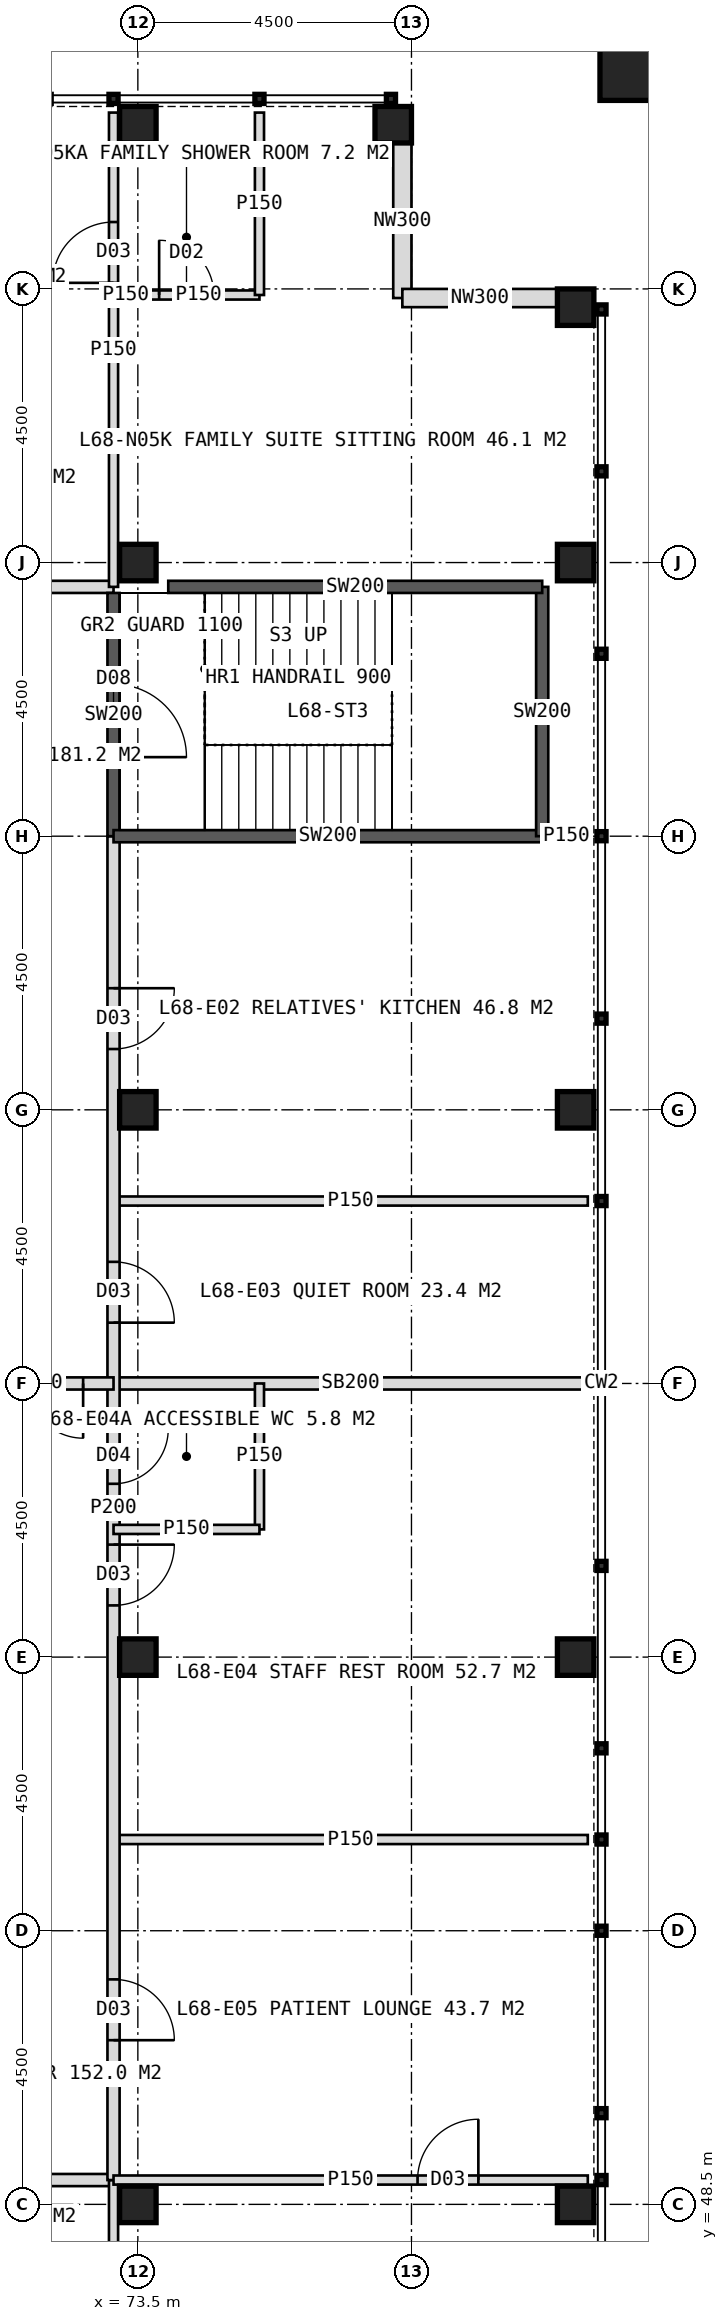
"""IFC4 building model, lengths in metres.
Left out: names, types, materials, properties, quantities, classifications, styles, units other than length and angle.
Written with IfcOpenShell. Run it as: python <this file> out.ifc"""

import sys

from ifc_helpers import new_model, si_unit, direction, frame, frame_2d, origin, origin_2d, place, context, subcontext, project, spatial, rectangle, hollow_rectangle, extrude, element, fill, save


model = new_model("IFC4")
c1 = context("Model", 3, precision=1e-05, world=origin(), true_north=direction((0.0, 1.0)))
c2 = subcontext(c1, "Body", "Model", "MODEL_VIEW")
j1 = project(units=[si_unit("LENGTHUNIT", "METRE"), si_unit("PLANEANGLEUNIT", "RADIAN")], contexts=[c1])
p1 = place(None, origin())
s1 = spatial("IfcSite", under=j1, at=p1, CompositionType="ELEMENT")
p2 = place(p1, origin())
s2 = spatial("IfcBuilding", under=s1, at=p2, CompositionType="ELEMENT")
p3 = place(p2, frame((0.0, 0.0, 282.0)))
s3 = spatial("IfcBuildingStorey", under=s2, at=p3, CompositionType="ELEMENT", Elevation=282.0)
for number, where, z_axis, x_axis in (
    (1, (73.5, 48.5, 0.0), (0.0, 0.0, 1.0), (1.0, 0.0, 0.0)),
    (2, (73.5, 75.5, 0.0), (0.0, 0.0, 1.0), (1.0, 0.0, 0.0)),
    (3, (73.5, 57.5, 0.0), (0.0, 0.0, 1.0), (1.0, 0.0, 0.0)),
    (4, (73.5, 66.5, 0.0), (0.0, 0.0, 1.0), (1.0, 0.0, 0.0)),
    (5, (80.7, 48.5, 0.0), (0.0, 0.0, 1.0), (1.0, 0.0, 0.0)),
    (6, (80.7, 57.5, 0.0), (0.0, 0.0, 1.0), (1.0, 0.0, 0.0)),
    (7, (80.7, 66.5, 0.0), (0.0, 0.0, 1.0), (1.0, 0.0, 0.0)),
    (8, (73.5, 82.7, 0.0), (0.0, 0.0, 1.0), (1.0, 0.0, 0.0)),
    (9, (80.7, 75.5, 0.0), (0.0, 0.0, 1.0), (1.0, 0.0, 0.0)),
    (10, (77.7, 82.7, 0.0), (0.0, 0.0, 1.0), (1.0, 0.0, 0.0)),
    (11, (80.7, 79.7, 0.0), (0.0, 0.0, 1.0), (1.0, 0.0, 0.0)),
):
    element("IfcColumn", number, at=place(p3, frame(where, z_axis=z_axis, x_axis=x_axis)), inside=s3, PredefinedType="COLUMN", context=c2, shape_type="SweptSolid", body=[
        extrude(hollow_rectangle(XDim=0.6, YDim=0.6, WallThickness=0.04, at=origin_2d()), origin(), (0.0, 0.0, 1.0), 4.0),
    ])
p4 = place(p3, frame((81.6, 83.6, 0.0), z_axis=(0.0, 0.0, 1.0), x_axis=(1.0, 0.0, 0.0)))
e12 = element("IfcColumn", 12, at=p4, inside=s3, PredefinedType="COLUMN", context=c2, shape_type="SweptSolid", body=[
    extrude(hollow_rectangle(XDim=1.0, YDim=1.0, WallThickness=0.06, at=origin_2d()), origin(), (0.0, 0.0, 1.0), 4.0),
])
for number, where, z_axis, x_axis in (
    (13, (77.85, 82.4, 0.0), (0.0, 0.0, 1.0), (0.0, -1.0, 0.0)),
    (14, (77.85, 79.85, 0.0), (0.0, 0.0, 1.0), (1.0, 0.0, 0.0)),
):
    element("IfcWall", number, at=place(p3, frame(where, z_axis=z_axis, x_axis=x_axis)), inside=s3, PredefinedType="ELEMENTEDWALL", context=c2, shape_type="SweptSolid", body=[
        extrude(rectangle(XDim=2.55, YDim=0.3, at=frame_2d((1.275, 0.0))), origin(), (0.0, 0.0, 1.0), 2.95),
    ])
p5 = place(p3, frame((46.9, 75.1, 0.0), z_axis=(0.0, 0.0, 1.0), x_axis=(1.0, 0.0, 0.0)))
e15 = element("IfcWall", 15, at=p5, inside=s3, PredefinedType="PARTITIONING", context=c2, shape_type="SweptSolid", body=[
    extrude(rectangle(XDim=26.2, YDim=0.2, at=frame_2d((13.1, 0.0))), origin(), (0.0, 0.0, 1.0), 3.75),
])
p6 = place(p5, frame((1.55, 0.0, 0.0)))
e16 = element("IfcOpeningElement", 16, at=p6, cuts=e15, PredefinedType="OPENING", context=c2, shape_type="SweptSolid", body=[
    extrude(rectangle(XDim=1.0, YDim=2.1, at=frame_2d((0.5, 1.05))), frame((0.0, 0.11, 0.0), z_axis=(0.0, -1.0, 0.0), x_axis=(1.0, 0.0, 0.0)), (0.0, 0.0, 1.0), 0.22),
])
p7 = place(p5, frame((6.75, 0.0, 0.0)))
e17 = element("IfcOpeningElement", 17, at=p7, cuts=e15, PredefinedType="OPENING", context=c2, shape_type="SweptSolid", body=[
    extrude(rectangle(XDim=1.0, YDim=2.1, at=frame_2d((0.5, 1.05))), frame((0.0, 0.11, 0.0), z_axis=(0.0, -1.0, 0.0), x_axis=(1.0, 0.0, 0.0)), (0.0, 0.0, 1.0), 0.22),
])
p8 = place(p5, frame((14.25, 0.0, 0.0)))
e18 = element("IfcOpeningElement", 18, at=p8, cuts=e15, PredefinedType="OPENING", context=c2, shape_type="SweptSolid", body=[
    extrude(rectangle(XDim=1.2, YDim=2.2, at=frame_2d((0.6, 1.1))), frame((0.0, 0.11, 0.0), z_axis=(0.0, -1.0, 0.0), x_axis=(1.0, 0.0, 0.0)), (0.0, 0.0, 1.0), 0.22),
])
p9 = place(p5, frame((18.45, 0.0, 0.0)))
e19 = element("IfcOpeningElement", 19, at=p9, cuts=e15, PredefinedType="OPENING", context=c2, shape_type="SweptSolid", body=[
    extrude(rectangle(XDim=1.0, YDim=2.1, at=frame_2d((0.5, 1.05))), frame((0.0, 0.11, 0.0), z_axis=(0.0, -1.0, 0.0), x_axis=(1.0, 0.0, 0.0)), (0.0, 0.0, 1.0), 0.22),
])
p10 = place(p5, frame((23.25, 0.0, 0.0)))
e20 = element("IfcOpeningElement", 20, at=p10, cuts=e15, PredefinedType="OPENING", context=c2, shape_type="SweptSolid", body=[
    extrude(rectangle(XDim=1.2, YDim=2.2, at=frame_2d((0.6, 1.1))), frame((0.0, 0.11, 0.0), z_axis=(0.0, -1.0, 0.0), x_axis=(1.0, 0.0, 0.0)), (0.0, 0.0, 1.0), 0.22),
])
p11 = place(p3, frame((73.1, 75.1, 0.0), z_axis=(0.0, 0.0, 1.0), x_axis=(0.0, 1.0, 0.0)))
e21 = element("IfcWall", 21, at=p11, inside=s3, PredefinedType="PARTITIONING", context=c2, shape_type="SweptSolid", body=[
    extrude(rectangle(XDim=7.8, YDim=0.15, at=frame_2d((3.9, 0.0))), origin(), (0.0, 0.0, 1.0), 3.75),
])
p12 = place(p11, frame((5.0, 0.0, 0.0)))
e22 = element("IfcOpeningElement", 22, at=p12, cuts=e21, PredefinedType="OPENING", context=c2, shape_type="SweptSolid", body=[
    extrude(rectangle(XDim=1.0, YDim=2.1, at=frame_2d((0.5, 1.05))), frame((0.0, 0.085, 0.0), z_axis=(0.0, -1.0, 0.0), x_axis=(1.0, 0.0, 0.0)), (0.0, 0.0, 1.0), 0.17),
])
p13 = place(p3, frame((73.1, 79.9, 0.0), z_axis=(0.0, 0.0, 1.0), x_axis=(1.0, 0.0, 0.0)))
e23 = element("IfcWall", 23, at=p13, inside=s3, PredefinedType="PARTITIONING", context=c2, shape_type="SweptSolid", body=[
    extrude(rectangle(XDim=0.4, YDim=0.15, at=frame_2d((0.2, 0.0))), origin(), (0.0, 0.0, 1.0), 3.75),
])
p14 = place(p3, frame((73.5, 79.9, 0.0), z_axis=(0.0, 0.0, 1.0), x_axis=(1.0, 0.0, 0.0)))
e24 = element("IfcWall", 24, at=p14, inside=s3, PredefinedType="PARTITIONING", context=c2, shape_type="SweptSolid", body=[
    extrude(rectangle(XDim=2.0, YDim=0.15, at=frame_2d((1.0, 0.0))), origin(), (0.0, 0.0, 1.0), 2.95),
])
p15 = place(p14, frame((0.35, 0.0, 0.0)))
e25 = element("IfcOpeningElement", 25, at=p15, cuts=e24, PredefinedType="OPENING", context=c2, shape_type="SweptSolid", body=[
    extrude(rectangle(XDim=0.9, YDim=2.1, at=frame_2d((0.45, 1.05))), frame((0.0, 0.085, 0.0), z_axis=(0.0, -1.0, 0.0), x_axis=(1.0, 0.0, 0.0)), (0.0, 0.0, 1.0), 0.17),
])
p16 = place(p3, frame((75.5, 79.9, 0.0), z_axis=(0.0, 0.0, 1.0), x_axis=(0.0, 1.0, 0.0)))
e26 = element("IfcWall", 26, at=p16, inside=s3, PredefinedType="PARTITIONING", context=c2, shape_type="SweptSolid", body=[
    extrude(rectangle(XDim=3.0, YDim=0.15, at=frame_2d((1.5, 0.0))), origin(), (0.0, 0.0, 1.0), 3.75),
])
p17 = place(p3, frame((73.1, 48.9, 0.0), z_axis=(0.0, 0.0, 1.0), x_axis=(-1.0, 0.0, 0.0)))
e27 = element("IfcWall", 27, at=p17, inside=s3, PredefinedType="PARTITIONING", context=c2, shape_type="SweptSolid", body=[
    extrude(rectangle(XDim=26.2, YDim=0.2, at=frame_2d((13.1, 0.0))), origin(), (0.0, 0.0, 1.0), 3.75),
])
p18 = place(p17, frame((1.75, 0.0, 0.0)))
e28 = element("IfcOpeningElement", 28, at=p18, cuts=e27, PredefinedType="OPENING", context=c2, shape_type="SweptSolid", body=[
    extrude(rectangle(XDim=1.2, YDim=2.2, at=frame_2d((0.6, 1.1))), frame((0.0, 0.11, 0.0), z_axis=(0.0, -1.0, 0.0), x_axis=(1.0, 0.0, 0.0)), (0.0, 0.0, 1.0), 0.22),
])
p19 = place(p17, frame((6.75, 0.0, 0.0)))
e29 = element("IfcOpeningElement", 29, at=p19, cuts=e27, PredefinedType="OPENING", context=c2, shape_type="SweptSolid", body=[
    extrude(rectangle(XDim=1.0, YDim=2.1, at=frame_2d((0.5, 1.05))), frame((0.0, 0.11, 0.0), z_axis=(0.0, -1.0, 0.0), x_axis=(1.0, 0.0, 0.0)), (0.0, 0.0, 1.0), 0.22),
])
p20 = place(p17, frame((11.85, 0.0, 0.0)))
e30 = element("IfcOpeningElement", 30, at=p20, cuts=e27, PredefinedType="OPENING", context=c2, shape_type="SweptSolid", body=[
    extrude(rectangle(XDim=1.0, YDim=2.1, at=frame_2d((0.5, 1.05))), frame((0.0, 0.11, 0.0), z_axis=(0.0, -1.0, 0.0), x_axis=(1.0, 0.0, 0.0)), (0.0, 0.0, 1.0), 0.22),
])
p21 = place(p17, frame((15.75, 0.0, 0.0)))
e31 = element("IfcOpeningElement", 31, at=p21, cuts=e27, PredefinedType="OPENING", context=c2, shape_type="SweptSolid", body=[
    extrude(rectangle(XDim=1.0, YDim=2.1, at=frame_2d((0.5, 1.05))), frame((0.0, 0.11, 0.0), z_axis=(0.0, -1.0, 0.0), x_axis=(1.0, 0.0, 0.0)), (0.0, 0.0, 1.0), 0.22),
])
p22 = place(p17, frame((23.25, 0.0, 0.0)))
e32 = element("IfcOpeningElement", 32, at=p22, cuts=e27, PredefinedType="OPENING", context=c2, shape_type="SweptSolid", body=[
    extrude(rectangle(XDim=1.2, YDim=2.2, at=frame_2d((0.6, 1.1))), frame((0.0, 0.11, 0.0), z_axis=(0.0, -1.0, 0.0), x_axis=(1.0, 0.0, 0.0)), (0.0, 0.0, 1.0), 0.22),
])
p23 = place(p3, frame((73.1, 48.9, 0.0), z_axis=(0.0, 0.0, 1.0), x_axis=(0.0, -1.0, 0.0)))
e33 = element("IfcWall", 33, at=p23, inside=s3, PredefinedType="PARTITIONING", context=c2, shape_type="SweptSolid", body=[
    extrude(rectangle(XDim=7.8, YDim=0.15, at=frame_2d((3.9, 0.0))), origin(), (0.0, 0.0, 1.0), 3.75),
])
p24 = place(p3, frame((80.2, 71.0, 0.0), z_axis=(0.0, 0.0, 1.0), x_axis=(1.0, 0.0, 0.0)))
e34 = element("IfcWall", 34, at=p24, inside=s3, PredefinedType="PARTITIONING", context=c2, shape_type="SweptSolid", body=[
    extrude(rectangle(XDim=0.7, YDim=0.15, at=frame_2d((0.35, 0.0))), origin(), (0.0, 0.0, 1.0), 3.75),
])
p25 = place(p3, frame((73.1, 65.0, 0.0), z_axis=(0.0, 0.0, 1.0), x_axis=(1.0, 0.0, 0.0)))
e35 = element("IfcWall", 35, at=p25, inside=s3, PredefinedType="PARTITIONING", context=c2, shape_type="SweptSolid", body=[
    extrude(rectangle(XDim=7.8, YDim=0.15, at=frame_2d((3.9, 0.0))), origin(), (0.0, 0.0, 1.0), 3.75),
])
p26 = place(p3, frame((73.1, 62.0, 0.0), z_axis=(0.0, 0.0, 1.0), x_axis=(1.0, 0.0, 0.0)))
e36 = element("IfcWall", 36, at=p26, inside=s3, PredefinedType="SOLIDWALL", context=c2, shape_type="SweptSolid", body=[
    extrude(rectangle(XDim=7.8, YDim=0.2, at=frame_2d((3.9, 0.0))), origin(), (0.0, 0.0, 1.0), 2.75),
])
p27 = place(p3, frame((73.1, 54.5, 0.0), z_axis=(0.0, 0.0, 1.0), x_axis=(1.0, 0.0, 0.0)))
e37 = element("IfcWall", 37, at=p27, inside=s3, PredefinedType="PARTITIONING", context=c2, shape_type="SweptSolid", body=[
    extrude(rectangle(XDim=7.8, YDim=0.15, at=frame_2d((3.9, 0.0))), origin(), (0.0, 0.0, 1.0), 3.75),
])
p28 = place(p3, frame((73.1, 71.0, 0.0), z_axis=(0.0, 0.0, 1.0), x_axis=(0.0, -1.0, 0.0)))
e38 = element("IfcWall", 38, at=p28, inside=s3, PredefinedType="PARTITIONING", context=c2, shape_type="SweptSolid", body=[
    extrude(rectangle(XDim=22.1, YDim=0.2, at=frame_2d((11.05, 0.0))), origin(), (0.0, 0.0, 1.0), 3.75),
])
p29 = place(p28, frame((2.5, 0.0, 0.0)))
e39 = element("IfcOpeningElement", 39, at=p29, cuts=e38, PredefinedType="OPENING", context=c2, shape_type="SweptSolid", body=[
    extrude(rectangle(XDim=1.0, YDim=2.1, at=frame_2d((0.5, 1.05))), frame((0.0, 0.11, 0.0), z_axis=(0.0, -1.0, 0.0), x_axis=(1.0, 0.0, 0.0)), (0.0, 0.0, 1.0), 0.22),
])
p30 = place(p28, frame((7.0, 0.0, 0.0)))
e40 = element("IfcOpeningElement", 40, at=p30, cuts=e38, PredefinedType="OPENING", context=c2, shape_type="SweptSolid", body=[
    extrude(rectangle(XDim=1.0, YDim=2.1, at=frame_2d((0.5, 1.05))), frame((0.0, 0.11, 0.0), z_axis=(0.0, -1.0, 0.0), x_axis=(1.0, 0.0, 0.0)), (0.0, 0.0, 1.0), 0.22),
])
p31 = place(p28, frame((9.75, 0.0, 0.0)))
e41 = element("IfcOpeningElement", 41, at=p31, cuts=e38, PredefinedType="OPENING", context=c2, shape_type="SweptSolid", body=[
    extrude(rectangle(XDim=0.9, YDim=2.1, at=frame_2d((0.45, 1.05))), frame((0.0, 0.11, 0.0), z_axis=(0.0, -1.0, 0.0), x_axis=(1.0, 0.0, 0.0)), (0.0, 0.0, 1.0), 0.22),
])
p32 = place(p28, frame((11.65, 0.0, 0.0)))
e42 = element("IfcOpeningElement", 42, at=p32, cuts=e38, PredefinedType="OPENING", context=c2, shape_type="SweptSolid", body=[
    extrude(rectangle(XDim=1.0, YDim=2.1, at=frame_2d((0.5, 1.05))), frame((0.0, 0.11, 0.0), z_axis=(0.0, -1.0, 0.0), x_axis=(1.0, 0.0, 0.0)), (0.0, 0.0, 1.0), 0.22),
])
p33 = place(p28, frame((18.8, 0.0, 0.0)))
e43 = element("IfcOpeningElement", 43, at=p33, cuts=e38, PredefinedType="OPENING", context=c2, shape_type="SweptSolid", body=[
    extrude(rectangle(XDim=1.0, YDim=2.1, at=frame_2d((0.5, 1.05))), frame((0.0, 0.11, 0.0), z_axis=(0.0, -1.0, 0.0), x_axis=(1.0, 0.0, 0.0)), (0.0, 0.0, 1.0), 0.22),
])
for number, where, z_axis, x_axis in (
    (44, (75.5, 62.0, 0.0), (0.0, 0.0, 1.0), (0.0, -1.0, 0.0)),
    (45, (73.1, 59.6, 0.0), (0.0, 0.0, 1.0), (1.0, 0.0, 0.0)),
):
    element("IfcWall", number, at=place(p3, frame(where, z_axis=z_axis, x_axis=x_axis)), inside=s3, PredefinedType="PARTITIONING", context=c2, shape_type="SweptSolid", body=[
        extrude(rectangle(XDim=2.4, YDim=0.15, at=frame_2d((1.2, 0.0))), origin(), (0.0, 0.0, 1.0), 3.75),
    ])
p34 = place(p3, frame((73.1, 48.9, 0.0), z_axis=(0.0, 0.0, 1.0), x_axis=(1.0, 0.0, 0.0)))
e46 = element("IfcWall", 46, at=p34, inside=s3, PredefinedType="PARTITIONING", context=c2, shape_type="SweptSolid", body=[
    extrude(rectangle(XDim=7.8, YDim=0.15, at=frame_2d((3.9, 0.0))), origin(), (0.0, 0.0, 1.0), 3.75),
])
p35 = place(p34, frame((5.0, 0.0, 0.0)))
e47 = element("IfcOpeningElement", 47, at=p35, cuts=e46, PredefinedType="OPENING", context=c2, shape_type="SweptSolid", body=[
    extrude(rectangle(XDim=1.0, YDim=2.1, at=frame_2d((0.5, 1.05))), frame((0.0, 0.085, 0.0), z_axis=(0.0, -1.0, 0.0), x_axis=(1.0, 0.0, 0.0)), (0.0, 0.0, 1.0), 0.17),
])
p36 = place(p3, frame((70.5, 62.0, 0.0), z_axis=(0.0, 0.0, 1.0), x_axis=(1.0, 0.0, 0.0)))
e48 = element("IfcWall", 48, at=p36, inside=s3, PredefinedType="SOLIDWALL", context=c2, shape_type="SweptSolid", body=[
    extrude(rectangle(XDim=2.6, YDim=0.2, at=frame_2d((1.3, 0.0))), origin(), (0.0, 0.0, 1.0), 2.75),
])
p37 = place(p36, frame((0.3, 0.0, 0.0)))
e49 = element("IfcOpeningElement", 49, at=p37, cuts=e48, PredefinedType="OPENING", context=c2, shape_type="SweptSolid", body=[
    extrude(rectangle(XDim=1.8, YDim=2.2, at=frame_2d((0.9, 1.1))), frame((0.0, 0.11, 0.0), z_axis=(0.0, -1.0, 0.0), x_axis=(1.0, 0.0, 0.0)), (0.0, 0.0, 1.0), 0.22),
])
p38 = place(p3, frame((73.1, 75.0, 0.0), z_axis=(0.0, 0.0, 1.0), x_axis=(0.0, -1.0, 0.0)))
e50 = element("IfcWall", 50, at=p38, inside=s3, PredefinedType="SOLIDWALL", context=c2, shape_type="SweptSolid", body=[
    extrude(rectangle(XDim=4.0, YDim=0.2, at=frame_2d((2.0, 0.0))), origin(), (0.0, 0.0, 1.0), 3.75),
])
p39 = place(p38, frame((1.5, 0.0, 0.0)))
e51 = element("IfcOpeningElement", 51, at=p39, cuts=e50, PredefinedType="OPENING", context=c2, shape_type="SweptSolid", body=[
    extrude(rectangle(XDim=1.2, YDim=2.1, at=frame_2d((0.6, 1.05))), frame((0.0, 0.11, 0.0), z_axis=(0.0, -1.0, 0.0), x_axis=(1.0, 0.0, 0.0)), (0.0, 0.0, 1.0), 0.22),
])
p40 = place(p3, frame((73.1, 71.0, 0.0), z_axis=(0.0, 0.0, 1.0), x_axis=(1.0, 0.0, 0.0)))
e52 = element("IfcWall", 52, at=p40, inside=s3, PredefinedType="SOLIDWALL", context=c2, shape_type="SweptSolid", body=[
    extrude(rectangle(XDim=7.05, YDim=0.2, at=frame_2d((3.525, 0.0))), origin(), (0.0, 0.0, 1.0), 3.75),
])
p41 = place(p3, frame((80.15, 71.0, 0.0), z_axis=(0.0, 0.0, 1.0), x_axis=(0.0, 1.0, 0.0)))
e53 = element("IfcWall", 53, at=p41, inside=s3, PredefinedType="SOLIDWALL", context=c2, shape_type="SweptSolid", body=[
    extrude(rectangle(XDim=4.1, YDim=0.2, at=frame_2d((2.05, 0.0))), origin(), (0.0, 0.0, 1.0), 3.75),
])
p42 = place(p3, frame((74.0, 75.1, 0.0), z_axis=(0.0, 0.0, 1.0), x_axis=(1.0, 0.0, 0.0)))
e54 = element("IfcWall", 54, at=p42, inside=s3, PredefinedType="SOLIDWALL", context=c2, shape_type="SweptSolid", body=[
    extrude(rectangle(XDim=6.15, YDim=0.2, at=frame_2d((3.075, 0.0))), origin(), (0.0, 0.0, 1.0), 3.75),
])
p43 = place(p15, origin())
e55 = element("IfcDoor", 55, at=p43, inside=s3, OperationType="SINGLE_SWING_LEFT", PredefinedType="DOOR", context=c2, shape_type="SweptSolid", body=[
    extrude(rectangle(XDim=0.9, YDim=2.1, at=frame_2d((0.45, 1.05))), frame((0.0, 0.025, 0.0), z_axis=(0.0, -1.0, 0.0), x_axis=(1.0, 0.0, 0.0)), (0.0, 0.0, 1.0), 0.05),
])
fill(e25, e55)
p44 = place(p12, origin())
e56 = element("IfcDoor", 56, at=p44, inside=s3, OperationType="SINGLE_SWING_LEFT", PredefinedType="DOOR", context=c2, shape_type="SweptSolid", body=[
    extrude(rectangle(XDim=1.0, YDim=2.1, at=frame_2d((0.5, 1.05))), frame((0.0, 0.025, 0.0), z_axis=(0.0, -1.0, 0.0), x_axis=(1.0, 0.0, 0.0)), (0.0, 0.0, 1.0), 0.05),
])
fill(e22, e56)
p45 = place(p29, origin())
e57 = element("IfcDoor", 57, at=p45, inside=s3, OperationType="SINGLE_SWING_LEFT", PredefinedType="DOOR", context=c2, shape_type="SweptSolid", body=[
    extrude(rectangle(XDim=1.0, YDim=2.1, at=frame_2d((0.5, 1.05))), frame((0.0, 0.025, 0.0), z_axis=(0.0, -1.0, 0.0), x_axis=(1.0, 0.0, 0.0)), (0.0, 0.0, 1.0), 0.05),
])
fill(e39, e57)
p46 = place(p30, origin())
e58 = element("IfcDoor", 58, at=p46, inside=s3, OperationType="SINGLE_SWING_RIGHT", PredefinedType="DOOR", context=c2, shape_type="SweptSolid", body=[
    extrude(rectangle(XDim=1.0, YDim=2.1, at=frame_2d((0.5, 1.05))), frame((0.0, 0.025, 0.0), z_axis=(0.0, -1.0, 0.0), x_axis=(1.0, 0.0, 0.0)), (0.0, 0.0, 1.0), 0.05),
])
fill(e40, e58)
p47 = place(p31, origin())
e59 = element("IfcDoor", 59, at=p47, inside=s3, OperationType="SINGLE_SWING_LEFT", PredefinedType="DOOR", context=c2, shape_type="SweptSolid", body=[
    extrude(rectangle(XDim=0.9, YDim=2.1, at=frame_2d((0.45, 1.05))), frame((0.0, 0.025, 0.0), z_axis=(0.0, -1.0, 0.0), x_axis=(1.0, 0.0, 0.0)), (0.0, 0.0, 1.0), 0.05),
])
fill(e41, e59)
p48 = place(p32, origin())
e60 = element("IfcDoor", 60, at=p48, inside=s3, OperationType="SINGLE_SWING_LEFT", PredefinedType="DOOR", context=c2, shape_type="SweptSolid", body=[
    extrude(rectangle(XDim=1.0, YDim=2.1, at=frame_2d((0.5, 1.05))), frame((0.0, 0.025, 0.0), z_axis=(0.0, -1.0, 0.0), x_axis=(1.0, 0.0, 0.0)), (0.0, 0.0, 1.0), 0.05),
])
fill(e42, e60)
p49 = place(p35, origin())
e61 = element("IfcDoor", 61, at=p49, inside=s3, OperationType="SINGLE_SWING_RIGHT", PredefinedType="DOOR", context=c2, shape_type="SweptSolid", body=[
    extrude(rectangle(XDim=1.0, YDim=2.1, at=frame_2d((0.5, 1.05))), frame((0.0, 0.025, 0.0), z_axis=(0.0, -1.0, 0.0), x_axis=(1.0, 0.0, 0.0)), (0.0, 0.0, 1.0), 0.05),
])
fill(e47, e61)
p50 = place(p33, origin())
e62 = element("IfcDoor", 62, at=p50, inside=s3, OperationType="SINGLE_SWING_RIGHT", PredefinedType="DOOR", context=c2, shape_type="SweptSolid", body=[
    extrude(rectangle(XDim=1.0, YDim=2.1, at=frame_2d((0.5, 1.05))), frame((0.0, 0.025, 0.0), z_axis=(0.0, -1.0, 0.0), x_axis=(1.0, 0.0, 0.0)), (0.0, 0.0, 1.0), 0.05),
])
fill(e43, e62)
p51 = place(p37, origin())
e63 = element("IfcDoor", 63, at=p51, inside=s3, OperationType="DOUBLE_DOOR_DOUBLE_SWING", PredefinedType="DOOR", context=c2, shape_type="SweptSolid", body=[
    extrude(rectangle(XDim=1.8, YDim=2.2, at=frame_2d((0.9, 1.1))), frame((0.0, 0.025, 0.0), z_axis=(0.0, -1.0, 0.0), x_axis=(1.0, 0.0, 0.0)), (0.0, 0.0, 1.0), 0.05),
])
fill(e49, e63)
p52 = place(p39, origin())
e64 = element("IfcDoor", 64, at=p52, inside=s3, OperationType="SINGLE_SWING_RIGHT", PredefinedType="DOOR", context=c2, shape_type="SweptSolid", body=[
    extrude(rectangle(XDim=1.2, YDim=2.1, at=frame_2d((0.6, 1.05))), frame((0.0, 0.025, 0.0), z_axis=(0.0, -1.0, 0.0), x_axis=(1.0, 0.0, 0.0)), (0.0, 0.0, 1.0), 0.05),
])
fill(e51, e64)
save(model, sys.argv[1])
